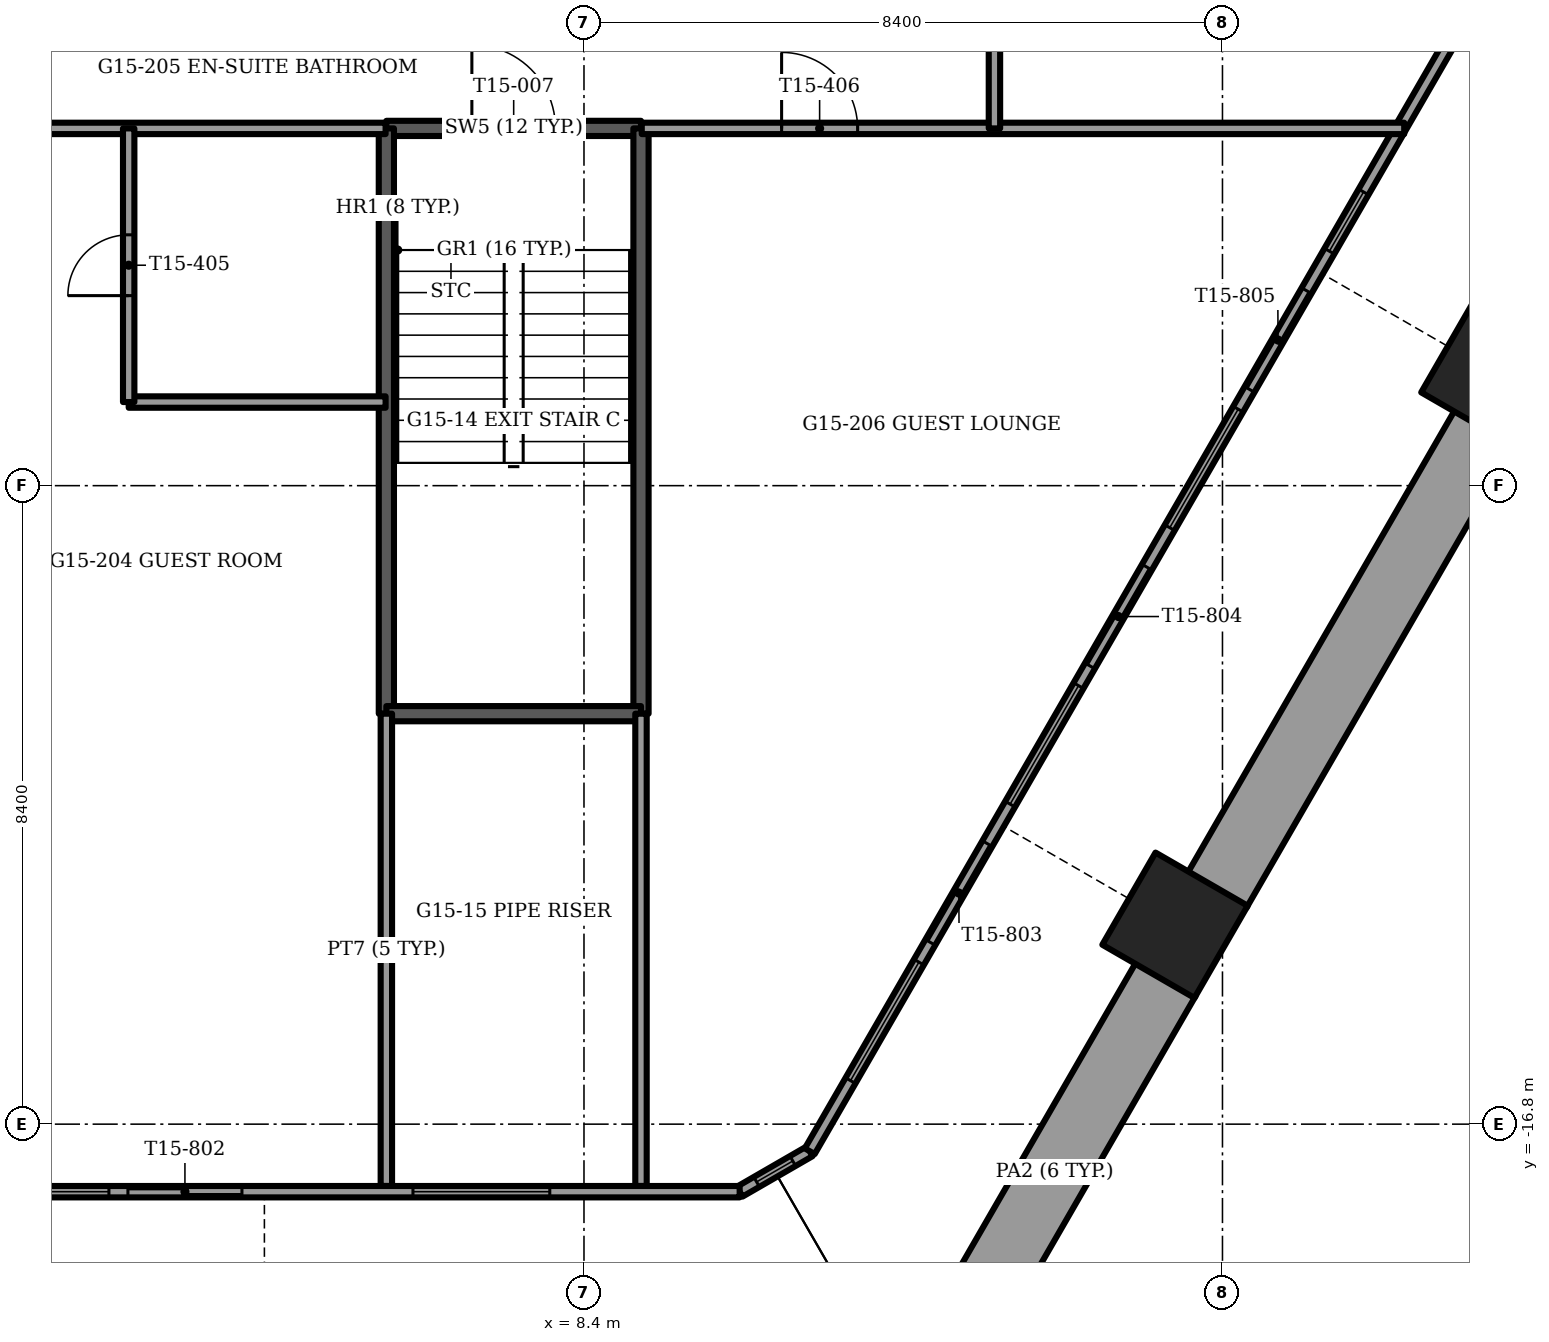
"""IFC4 building model, lengths in metres.
Left out: names, types, materials, properties, quantities, classifications, styles, units other than length and angle.
Written with IfcOpenShell. Run it as: python <this file> out.ifc"""

import sys

from ifc_helpers import new_model, si_unit, direction, frame, frame_2d, origin, origin_2d, place, context, subcontext, project, spatial, rectangle, extrude, element, fill, save


model = new_model("IFC4")
c1 = context("Model", 3, precision=1e-05, world=origin(), true_north=direction((0.0, 1.0)))
c2 = subcontext(c1, "Body", "Model", "MODEL_VIEW")
j1 = project(units=[si_unit("LENGTHUNIT", "METRE"), si_unit("PLANEANGLEUNIT", "RADIAN")], contexts=[c1])
p1 = place(None, origin())
s1 = spatial("IfcSite", under=j1, at=p1, CompositionType="ELEMENT")
p2 = place(p1, origin())
s2 = spatial("IfcBuilding", under=s1, at=p2, CompositionType="ELEMENT")
p3 = place(p2, frame((0.0, 0.0, 61.75)))
s3 = spatial("IfcBuildingStorey", under=s2, at=p3, CompositionType="ELEMENT", Elevation=61.75)
for number, where, z_axis, x_axis in (
    (1, (16.175, -14.183, -1.2), (0.0, 0.0, 1.0), (-0.5, -0.866, 0.0)),
    (2, (20.371, -6.917, -1.2), (0.0, 0.0, 1.0), (-0.5, -0.866, 0.0)),
):
    element("IfcColumn", number, at=place(p3, frame(where, z_axis=z_axis, x_axis=x_axis)), inside=s3, PredefinedType="COLUMN", context=c2, shape_type="SweptSolid", body=[
        extrude(rectangle(XDim=1.4, YDim=1.4, at=origin_2d()), origin(), (0.0, 0.0, 1.0), 3.75),
    ])
p4 = place(p3, frame((13.13, -19.958, 0.0), z_axis=(0.0, 0.0, 1.0), x_axis=(0.500001680296, 0.866024433663, 0.0)))
e3 = element("IfcWall", 3, at=p4, inside=s3, PredefinedType="PARAPET", context=c2, shape_type="SweptSolid", body=[
    extrude(rectangle(XDim=5.853, YDim=0.9, at=frame_2d((2.927, 0.0))), origin(), (0.0, 0.0, 1.0), 1.1),
])
p5 = place(p3, frame((16.727, -13.728, 0.0), z_axis=(0.0, 0.0, 1.0), x_axis=(0.499997206141, 0.866027016814, 0.0)))
e4 = element("IfcWall", 4, at=p5, inside=s3, PredefinedType="PARAPET", context=c2, shape_type="SweptSolid", body=[
    extrude(rectangle(XDim=7.051, YDim=0.9, at=frame_2d((3.525, 0.0))), origin(), (0.0, 0.0, 1.0), 1.1),
])
p6 = place(p3, frame((-10.448, -17.689, 0.0), z_axis=(0.0, 0.0, 1.0), x_axis=(1.0, 0.0, 0.0)))
e5 = element("IfcWall", 5, at=p6, inside=s3, PredefinedType="SOLIDWALL", context=c2, shape_type="SweptSolid", body=[
    extrude(rectangle(XDim=20.896, YDim=0.15, at=frame_2d((10.448, 0.0))), origin(), (0.0, 0.0, 1.0), 3.45),
])
p7 = place(p6, frame((2.348, 0.0, 0.15)))
e6 = element("IfcOpeningElement", 6, at=p7, cuts=e5, PredefinedType="OPENING", context=c2, shape_type="SweptSolid", body=[
    extrude(rectangle(XDim=1.8, YDim=2.85, at=frame_2d((0.9, 1.425))), frame((0.0, 0.075, 0.0), z_axis=(0.0, -1.0, 0.0), x_axis=(1.0, 0.0, 0.0)), (0.0, 0.0, 1.0), 0.15),
])
p8 = place(p6, frame((6.598, 0.0, 0.15)))
e7 = element("IfcOpeningElement", 7, at=p8, cuts=e5, PredefinedType="OPENING", context=c2, shape_type="SweptSolid", body=[
    extrude(rectangle(XDim=0.9, YDim=2.85, at=frame_2d((0.45, 1.425))), frame((0.0, 0.075, 0.0), z_axis=(0.0, -1.0, 0.0), x_axis=(1.0, 0.0, 0.0)), (0.0, 0.0, 1.0), 0.15),
])
p9 = place(p6, frame((8.048, 0.0, 0.0)))
e8 = element("IfcOpeningElement", 8, at=p9, cuts=e5, PredefinedType="OPENING", context=c2, shape_type="SweptSolid", body=[
    extrude(rectangle(XDim=1.5, YDim=2.4, at=frame_2d((0.75, 1.2))), frame((0.0, 0.075, 0.0), z_axis=(0.0, -1.0, 0.0), x_axis=(1.0, 0.0, 0.0)), (0.0, 0.0, 1.0), 0.15),
])
p10 = place(p6, frame((10.798, 0.0, 0.15)))
e9 = element("IfcOpeningElement", 9, at=p10, cuts=e5, PredefinedType="OPENING", context=c2, shape_type="SweptSolid", body=[
    extrude(rectangle(XDim=1.8, YDim=2.85, at=frame_2d((0.9, 1.425))), frame((0.0, 0.075, 0.0), z_axis=(0.0, -1.0, 0.0), x_axis=(1.0, 0.0, 0.0)), (0.0, 0.0, 1.0), 0.15),
])
p11 = place(p6, frame((12.848, 0.0, 0.0)))
e10 = element("IfcOpeningElement", 10, at=p11, cuts=e5, PredefinedType="OPENING", context=c2, shape_type="SweptSolid", body=[
    extrude(rectangle(XDim=1.5, YDim=2.4, at=frame_2d((0.75, 1.2))), frame((0.0, 0.075, 0.0), z_axis=(0.0, -1.0, 0.0), x_axis=(1.0, 0.0, 0.0)), (0.0, 0.0, 1.0), 0.15),
])
p12 = place(p6, frame((16.598, 0.0, 0.15)))
e11 = element("IfcOpeningElement", 11, at=p12, cuts=e5, PredefinedType="OPENING", context=c2, shape_type="SweptSolid", body=[
    extrude(rectangle(XDim=1.8, YDim=2.85, at=frame_2d((0.9, 1.425))), frame((0.0, 0.075, 0.0), z_axis=(0.0, -1.0, 0.0), x_axis=(1.0, 0.0, 0.0)), (0.0, 0.0, 1.0), 0.15),
])
p13 = place(p3, frame((11.37, -17.156, 0.0), z_axis=(0.0, 0.0, 1.0), x_axis=(0.499995095024, 0.866028235655, 0.0)))
e12 = element("IfcWall", 12, at=p13, inside=s3, PredefinedType="SOLIDWALL", context=c2, shape_type="SweptSolid", body=[
    extrude(rectangle(XDim=18.345, YDim=0.15, at=frame_2d((9.172, 0.0))), origin(), (0.0, 0.0, 1.0), 3.45),
])
p14 = place(p13, frame((1.073, 0.0, 0.15)))
e13 = element("IfcOpeningElement", 13, at=p14, cuts=e12, PredefinedType="OPENING", context=c2, shape_type="SweptSolid", body=[
    extrude(rectangle(XDim=1.8, YDim=2.85, at=frame_2d((0.9, 1.425))), frame((0.0, 0.075, 0.0), z_axis=(0.0, -1.0, 0.0), x_axis=(1.0, 0.0, 0.0)), (0.0, 0.0, 1.0), 0.15),
])
p15 = place(p13, frame((3.172, 0.0, 0.0)))
e14 = element("IfcOpeningElement", 14, at=p15, cuts=e12, PredefinedType="OPENING", context=c2, shape_type="SweptSolid", body=[
    extrude(rectangle(XDim=1.5, YDim=2.4, at=frame_2d((0.75, 1.2))), frame((0.0, 0.075, 0.0), z_axis=(0.0, -1.0, 0.0), x_axis=(1.0, 0.0, 0.0)), (0.0, 0.0, 1.0), 0.15),
])
p16 = place(p13, frame((5.272, 0.0, 0.15)))
e15 = element("IfcOpeningElement", 15, at=p16, cuts=e12, PredefinedType="OPENING", context=c2, shape_type="SweptSolid", body=[
    extrude(rectangle(XDim=1.8, YDim=2.85, at=frame_2d((0.9, 1.425))), frame((0.0, 0.075, 0.0), z_axis=(0.0, -1.0, 0.0), x_axis=(1.0, 0.0, 0.0)), (0.0, 0.0, 1.0), 0.15),
])
p17 = place(p13, frame((7.372, 0.0, 0.0)))
e16 = element("IfcOpeningElement", 16, at=p17, cuts=e12, PredefinedType="OPENING", context=c2, shape_type="SweptSolid", body=[
    extrude(rectangle(XDim=1.5, YDim=2.4, at=frame_2d((0.75, 1.2))), frame((0.0, 0.075, 0.0), z_axis=(0.0, -1.0, 0.0), x_axis=(1.0, 0.0, 0.0)), (0.0, 0.0, 1.0), 0.15),
])
p18 = place(p13, frame((9.472, 0.0, 0.15)))
e17 = element("IfcOpeningElement", 17, at=p18, cuts=e12, PredefinedType="OPENING", context=c2, shape_type="SweptSolid", body=[
    extrude(rectangle(XDim=1.8, YDim=2.85, at=frame_2d((0.9, 1.425))), frame((0.0, 0.075, 0.0), z_axis=(0.0, -1.0, 0.0), x_axis=(1.0, 0.0, 0.0)), (0.0, 0.0, 1.0), 0.15),
])
p19 = place(p13, frame((11.573, 0.0, 0.0)))
e18 = element("IfcOpeningElement", 18, at=p19, cuts=e12, PredefinedType="OPENING", context=c2, shape_type="SweptSolid", body=[
    extrude(rectangle(XDim=1.5, YDim=2.4, at=frame_2d((0.75, 1.2))), frame((0.0, 0.075, 0.0), z_axis=(0.0, -1.0, 0.0), x_axis=(1.0, 0.0, 0.0)), (0.0, 0.0, 1.0), 0.15),
])
p20 = place(p13, frame((13.672, 0.0, 0.15)))
e19 = element("IfcOpeningElement", 19, at=p20, cuts=e12, PredefinedType="OPENING", context=c2, shape_type="SweptSolid", body=[
    extrude(rectangle(XDim=0.9, YDim=2.85, at=frame_2d((0.45, 1.425))), frame((0.0, 0.075, 0.0), z_axis=(0.0, -1.0, 0.0), x_axis=(1.0, 0.0, 0.0)), (0.0, 0.0, 1.0), 0.15),
])
p21 = place(p3, frame((10.448, -17.689, 0.0), z_axis=(0.0, 0.0, 1.0), x_axis=(0.865948903286, 0.500132479346, 0.0)))
e20 = element("IfcWall", 20, at=p21, inside=s3, PredefinedType="SOLIDWALL", context=c2, shape_type="SweptSolid", body=[
    extrude(rectangle(XDim=1.065, YDim=0.15, at=frame_2d((0.533, 0.0))), origin(), (0.0, 0.0, 1.0), 3.45),
])
p22 = place(p21, frame((0.258, 0.0, 0.15)))
e21 = element("IfcOpeningElement", 21, at=p22, cuts=e20, PredefinedType="OPENING", context=c2, shape_type="SweptSolid", body=[
    extrude(rectangle(XDim=0.55, YDim=2.85, at=frame_2d((0.275, 1.425))), frame((0.0, 0.075, 0.0), z_axis=(0.0, -1.0, 0.0), x_axis=(1.0, 0.0, 0.0)), (0.0, 0.0, 1.0), 0.15),
])
p23 = place(p3, frame((5.8, -3.7, -0.3), z_axis=(0.0, 0.0, 1.0), x_axis=(1.0, 0.0, 0.0)))
e22 = element("IfcWall", 22, at=p23, inside=s3, PredefinedType="SOLIDWALL", context=c2, shape_type="SweptSolid", body=[
    extrude(rectangle(XDim=3.35, YDim=0.2, at=frame_2d((1.675, 0.0))), origin(), (0.0, 0.0, 1.0), 3.75),
])
p24 = place(p23, frame((1.125, 0.0, 0.0)))
e23 = element("IfcOpeningElement", 23, at=p24, cuts=e22, PredefinedType="OPENING", context=c2, shape_type="SweptSolid", body=[
    extrude(rectangle(XDim=1.1, YDim=2.1, at=frame_2d((0.55, 1.05))), frame((0.0, 0.1, 0.0), z_axis=(0.0, -1.0, 0.0), x_axis=(1.0, 0.0, 0.0)), (0.0, 0.0, 1.0), 0.2),
])
for number, where, z_axis, x_axis in (
    (24, (5.8, -3.7, -0.3), (0.0, 0.0, 1.0), (0.0, -1.0, 0.0)),
    (25, (9.15, -3.7, -0.3), (0.0, 0.0, 1.0), (0.0, -1.0, 0.0)),
):
    element("IfcWall", number, at=place(p3, frame(where, z_axis=z_axis, x_axis=x_axis)), inside=s3, PredefinedType="SOLIDWALL", context=c2, shape_type="SweptSolid", body=[
        extrude(rectangle(XDim=7.7, YDim=0.2, at=frame_2d((3.85, 0.0))), origin(), (0.0, 0.0, 1.0), 3.75),
    ])
p25 = place(p3, frame((5.8, -11.4, -0.3), z_axis=(0.0, 0.0, 1.0), x_axis=(1.0, 0.0, 0.0)))
e26 = element("IfcWall", 26, at=p25, inside=s3, PredefinedType="SOLIDWALL", context=c2, shape_type="SweptSolid", body=[
    extrude(rectangle(XDim=3.35, YDim=0.2, at=frame_2d((1.675, 0.0))), origin(), (0.0, 0.0, 1.0), 3.75),
])
for number, where, z_axis, x_axis in (
    (27, (5.8, -11.4, 0.0), (0.0, 0.0, 1.0), (0.0, -1.0, 0.0)),
    (28, (9.15, -11.4, 0.0), (0.0, 0.0, 1.0), (0.0, -1.0, 0.0)),
):
    element("IfcWall", number, at=place(p3, frame(where, z_axis=z_axis, x_axis=x_axis)), inside=s3, PredefinedType="PARTITIONING", context=c2, shape_type="SweptSolid", body=[
        extrude(rectangle(XDim=6.214, YDim=0.15, at=frame_2d((3.107, 0.0))), origin(), (0.0, 0.0, 1.0), 3.45),
    ])
p26 = place(p3, frame((2.41, -7.3, 0.0), z_axis=(0.0, 0.0, 1.0), x_axis=(1.0, 0.0, 0.0)))
e29 = element("IfcWall", 29, at=p26, inside=s3, PredefinedType="PARTITIONING", context=c2, shape_type="SweptSolid", body=[
    extrude(rectangle(XDim=3.38, YDim=0.15, at=frame_2d((1.69, 0.0))), origin(), (0.0, 0.0, 1.0), 3.45),
])
p27 = place(p3, frame((-5.79, -3.7, 0.0), z_axis=(0.0, 0.0, 1.0), x_axis=(1.0, 0.0, 0.0)))
e30 = element("IfcWall", 30, at=p27, inside=s3, PredefinedType="PARTITIONING", context=c2, shape_type="SweptSolid", body=[
    extrude(rectangle(XDim=11.58, YDim=0.15, at=frame_2d((5.79, 0.0))), origin(), (0.0, 0.0, 1.0), 3.45),
])
p28 = place(p27, frame((0.24, 0.0, 0.0)))
e31 = element("IfcOpeningElement", 31, at=p28, cuts=e30, PredefinedType="OPENING", context=c2, shape_type="SweptSolid", body=[
    extrude(rectangle(XDim=1.0, YDim=2.1, at=frame_2d((0.5, 1.05))), frame((0.0, 0.075, 0.0), z_axis=(0.0, -1.0, 0.0), x_axis=(1.0, 0.0, 0.0)), (0.0, 0.0, 1.0), 0.15),
])
p29 = place(p27, frame((6.04, 0.0, 0.0)))
e32 = element("IfcOpeningElement", 32, at=p29, cuts=e30, PredefinedType="OPENING", context=c2, shape_type="SweptSolid", body=[
    extrude(rectangle(XDim=1.0, YDim=2.1, at=frame_2d((0.5, 1.05))), frame((0.0, 0.075, 0.0), z_axis=(0.0, -1.0, 0.0), x_axis=(1.0, 0.0, 0.0)), (0.0, 0.0, 1.0), 0.15),
])
p30 = place(p3, frame((9.16, -3.7, 0.0), z_axis=(0.0, 0.0, 1.0), x_axis=(1.0, 0.0, 0.0)))
e33 = element("IfcWall", 33, at=p30, inside=s3, PredefinedType="PARTITIONING", context=c2, shape_type="SweptSolid", body=[
    extrude(rectangle(XDim=10.031, YDim=0.15, at=frame_2d((5.016, 0.0))), origin(), (0.0, 0.0, 1.0), 3.45),
])
p31 = place(p30, frame((1.84, 0.0, 0.0)))
e34 = element("IfcOpeningElement", 34, at=p31, cuts=e33, PredefinedType="OPENING", context=c2, shape_type="SweptSolid", body=[
    extrude(rectangle(XDim=1.0, YDim=2.1, at=frame_2d((0.5, 1.05))), frame((0.0, 0.075, 0.0), z_axis=(0.0, -1.0, 0.0), x_axis=(1.0, 0.0, 0.0)), (0.0, 0.0, 1.0), 0.15),
])
p32 = place(p3, frame((13.8, -3.7, 0.0), z_axis=(0.0, 0.0, 1.0), x_axis=(0.0, 1.0, 0.0)))
e35 = element("IfcWall", 35, at=p32, inside=s3, PredefinedType="PARTITIONING", context=c2, shape_type="SweptSolid", body=[
    extrude(rectangle(XDim=15.265, YDim=0.15, at=frame_2d((7.632, 0.0))), origin(), (0.0, 0.0, 1.0), 3.45),
])
p33 = place(p32, frame((1.6, 0.0, 0.0)))
e36 = element("IfcOpeningElement", 36, at=p33, cuts=e35, PredefinedType="OPENING", context=c2, shape_type="SweptSolid", body=[
    extrude(rectangle(XDim=1.0, YDim=2.1, at=frame_2d((0.5, 1.05))), frame((0.0, 0.075, 0.0), z_axis=(0.0, -1.0, 0.0), x_axis=(1.0, 0.0, 0.0)), (0.0, 0.0, 1.0), 0.15),
])
p34 = place(p32, frame((4.45, 0.0, 0.0)))
e37 = element("IfcOpeningElement", 37, at=p34, cuts=e35, PredefinedType="OPENING", context=c2, shape_type="SweptSolid", body=[
    extrude(rectangle(XDim=1.0, YDim=2.1, at=frame_2d((0.5, 1.05))), frame((0.0, 0.075, 0.0), z_axis=(0.0, -1.0, 0.0), x_axis=(1.0, 0.0, 0.0)), (0.0, 0.0, 1.0), 0.15),
])
p35 = place(p32, frame((11.212, 0.0, 0.0)))
e38 = element("IfcOpeningElement", 38, at=p35, cuts=e35, PredefinedType="OPENING", context=c2, shape_type="SweptSolid", body=[
    extrude(rectangle(XDim=1.0, YDim=2.1, at=frame_2d((0.5, 1.05))), frame((0.0, 0.075, 0.0), z_axis=(0.0, -1.0, 0.0), x_axis=(1.0, 0.0, 0.0)), (0.0, 0.0, 1.0), 0.15),
])
p36 = place(p3, frame((2.41, -7.3, 0.0), z_axis=(0.0, 0.0, 1.0), x_axis=(0.0, 1.0, 0.0)))
e39 = element("IfcWall", 39, at=p36, inside=s3, PredefinedType="PARTITIONING", context=c2, shape_type="SweptSolid", body=[
    extrude(rectangle(XDim=3.6, YDim=0.15, at=frame_2d((1.8, 0.0))), origin(), (0.0, 0.0, 1.0), 3.45),
])
p37 = place(p36, frame((1.4, 0.0, 0.0)))
e40 = element("IfcOpeningElement", 40, at=p37, cuts=e39, PredefinedType="OPENING", context=c2, shape_type="SweptSolid", body=[
    extrude(rectangle(XDim=0.8, YDim=2.1, at=frame_2d((0.4, 1.05))), frame((0.0, 0.075, 0.0), z_axis=(0.0, -1.0, 0.0), x_axis=(1.0, 0.0, 0.0)), (0.0, 0.0, 1.0), 0.15),
])
p38 = place(p10, origin())
e41 = element("IfcWindow", 41, at=p38, inside=s3, PartitioningType="SINGLE_PANEL", PredefinedType="WINDOW", context=c2, shape_type="SweptSolid", body=[
    extrude(rectangle(XDim=1.8, YDim=2.85, at=frame_2d((0.9, 1.425))), frame((0.0, 0.03, 0.0), z_axis=(0.0, -1.0, 0.0), x_axis=(1.0, 0.0, 0.0)), (0.0, 0.0, 1.0), 0.06),
])
fill(e9, e41)
p39 = place(p11, origin())
e42 = element("IfcDoor", 42, at=p39, inside=s3, OperationType="SLIDING_TO_LEFT", PredefinedType="DOOR", context=c2, shape_type="SweptSolid", body=[
    extrude(rectangle(XDim=1.5, YDim=2.4, at=frame_2d((0.75, 1.2))), frame((0.0, 0.025, 0.0), z_axis=(0.0, -1.0, 0.0), x_axis=(1.0, 0.0, 0.0)), (0.0, 0.0, 1.0), 0.05),
])
fill(e10, e42)
p40 = place(p12, origin())
e43 = element("IfcWindow", 43, at=p40, inside=s3, PartitioningType="SINGLE_PANEL", PredefinedType="WINDOW", context=c2, shape_type="SweptSolid", body=[
    extrude(rectangle(XDim=1.8, YDim=2.85, at=frame_2d((0.9, 1.425))), frame((0.0, 0.03, 0.0), z_axis=(0.0, -1.0, 0.0), x_axis=(1.0, 0.0, 0.0)), (0.0, 0.0, 1.0), 0.06),
])
fill(e11, e43)
p41 = place(p14, origin())
e44 = element("IfcWindow", 44, at=p41, inside=s3, PartitioningType="SINGLE_PANEL", PredefinedType="WINDOW", context=c2, shape_type="SweptSolid", body=[
    extrude(rectangle(XDim=1.8, YDim=2.85, at=frame_2d((0.9, 1.425))), frame((0.0, 0.03, 0.0), z_axis=(0.0, -1.0, 0.0), x_axis=(1.0, 0.0, 0.0)), (0.0, 0.0, 1.0), 0.06),
])
fill(e13, e44)
p42 = place(p15, origin())
e45 = element("IfcDoor", 45, at=p42, inside=s3, OperationType="SLIDING_TO_LEFT", PredefinedType="DOOR", context=c2, shape_type="SweptSolid", body=[
    extrude(rectangle(XDim=1.5, YDim=2.4, at=frame_2d((0.75, 1.2))), frame((0.0, 0.025, 0.0), z_axis=(0.0, -1.0, 0.0), x_axis=(1.0, 0.0, 0.0)), (0.0, 0.0, 1.0), 0.05),
])
fill(e14, e45)
p43 = place(p16, origin())
e46 = element("IfcWindow", 46, at=p43, inside=s3, PartitioningType="SINGLE_PANEL", PredefinedType="WINDOW", context=c2, shape_type="SweptSolid", body=[
    extrude(rectangle(XDim=1.8, YDim=2.85, at=frame_2d((0.9, 1.425))), frame((0.0, 0.03, 0.0), z_axis=(0.0, -1.0, 0.0), x_axis=(1.0, 0.0, 0.0)), (0.0, 0.0, 1.0), 0.06),
])
fill(e15, e46)
p44 = place(p17, origin())
e47 = element("IfcDoor", 47, at=p44, inside=s3, OperationType="SLIDING_TO_RIGHT", PredefinedType="DOOR", context=c2, shape_type="SweptSolid", body=[
    extrude(rectangle(XDim=1.5, YDim=2.4, at=frame_2d((0.75, 1.2))), frame((0.0, 0.025, 0.0), z_axis=(0.0, -1.0, 0.0), x_axis=(1.0, 0.0, 0.0)), (0.0, 0.0, 1.0), 0.05),
])
fill(e16, e47)
p45 = place(p18, origin())
e48 = element("IfcWindow", 48, at=p45, inside=s3, PartitioningType="SINGLE_PANEL", PredefinedType="WINDOW", context=c2, shape_type="SweptSolid", body=[
    extrude(rectangle(XDim=1.8, YDim=2.85, at=frame_2d((0.9, 1.425))), frame((0.0, 0.03, 0.0), z_axis=(0.0, -1.0, 0.0), x_axis=(1.0, 0.0, 0.0)), (0.0, 0.0, 1.0), 0.06),
])
fill(e17, e48)
p46 = place(p19, origin())
e49 = element("IfcDoor", 49, at=p46, inside=s3, OperationType="SLIDING_TO_LEFT", PredefinedType="DOOR", context=c2, shape_type="SweptSolid", body=[
    extrude(rectangle(XDim=1.5, YDim=2.4, at=frame_2d((0.75, 1.2))), frame((0.0, 0.025, 0.0), z_axis=(0.0, -1.0, 0.0), x_axis=(1.0, 0.0, 0.0)), (0.0, 0.0, 1.0), 0.05),
])
fill(e18, e49)
p47 = place(p20, origin())
e50 = element("IfcWindow", 50, at=p47, inside=s3, PartitioningType="SINGLE_PANEL", PredefinedType="WINDOW", context=c2, shape_type="SweptSolid", body=[
    extrude(rectangle(XDim=0.9, YDim=2.85, at=frame_2d((0.45, 1.425))), frame((0.0, 0.03, 0.0), z_axis=(0.0, -1.0, 0.0), x_axis=(1.0, 0.0, 0.0)), (0.0, 0.0, 1.0), 0.06),
])
fill(e19, e50)
p48 = place(p22, origin())
e51 = element("IfcWindow", 51, at=p48, inside=s3, PartitioningType="SINGLE_PANEL", PredefinedType="WINDOW", context=c2, shape_type="SweptSolid", body=[
    extrude(rectangle(XDim=0.55, YDim=2.85, at=frame_2d((0.275, 1.425))), frame((0.0, 0.03, 0.0), z_axis=(0.0, -1.0, 0.0), x_axis=(1.0, 0.0, 0.0)), (0.0, 0.0, 1.0), 0.06),
])
fill(e21, e51)
p49 = place(p24, origin())
e52 = element("IfcDoor", 52, at=p49, inside=s3, OperationType="SINGLE_SWING_LEFT", PredefinedType="DOOR", context=c2, shape_type="SweptSolid", body=[
    extrude(rectangle(XDim=1.1, YDim=2.1, at=frame_2d((0.55, 1.05))), frame((0.0, 0.025, 0.0), z_axis=(0.0, -1.0, 0.0), x_axis=(1.0, 0.0, 0.0)), (0.0, 0.0, 1.0), 0.05),
])
fill(e23, e52)
p50 = place(p37, origin())
e53 = element("IfcDoor", 53, at=p50, inside=s3, OperationType="SINGLE_SWING_RIGHT", PredefinedType="DOOR", context=c2, shape_type="SweptSolid", body=[
    extrude(rectangle(XDim=0.8, YDim=2.1, at=frame_2d((0.4, 1.05))), frame((0.0, 0.025, 0.0), z_axis=(0.0, -1.0, 0.0), x_axis=(1.0, 0.0, 0.0)), (0.0, 0.0, 1.0), 0.05),
])
fill(e40, e53)
p51 = place(p31, origin())
e54 = element("IfcDoor", 54, at=p51, inside=s3, OperationType="SINGLE_SWING_LEFT", PredefinedType="DOOR", context=c2, shape_type="SweptSolid", body=[
    extrude(rectangle(XDim=1.0, YDim=2.1, at=frame_2d((0.5, 1.05))), frame((0.0, 0.025, 0.0), z_axis=(0.0, -1.0, 0.0), x_axis=(1.0, 0.0, 0.0)), (0.0, 0.0, 1.0), 0.05),
])
fill(e34, e54)
save(model, sys.argv[1])
